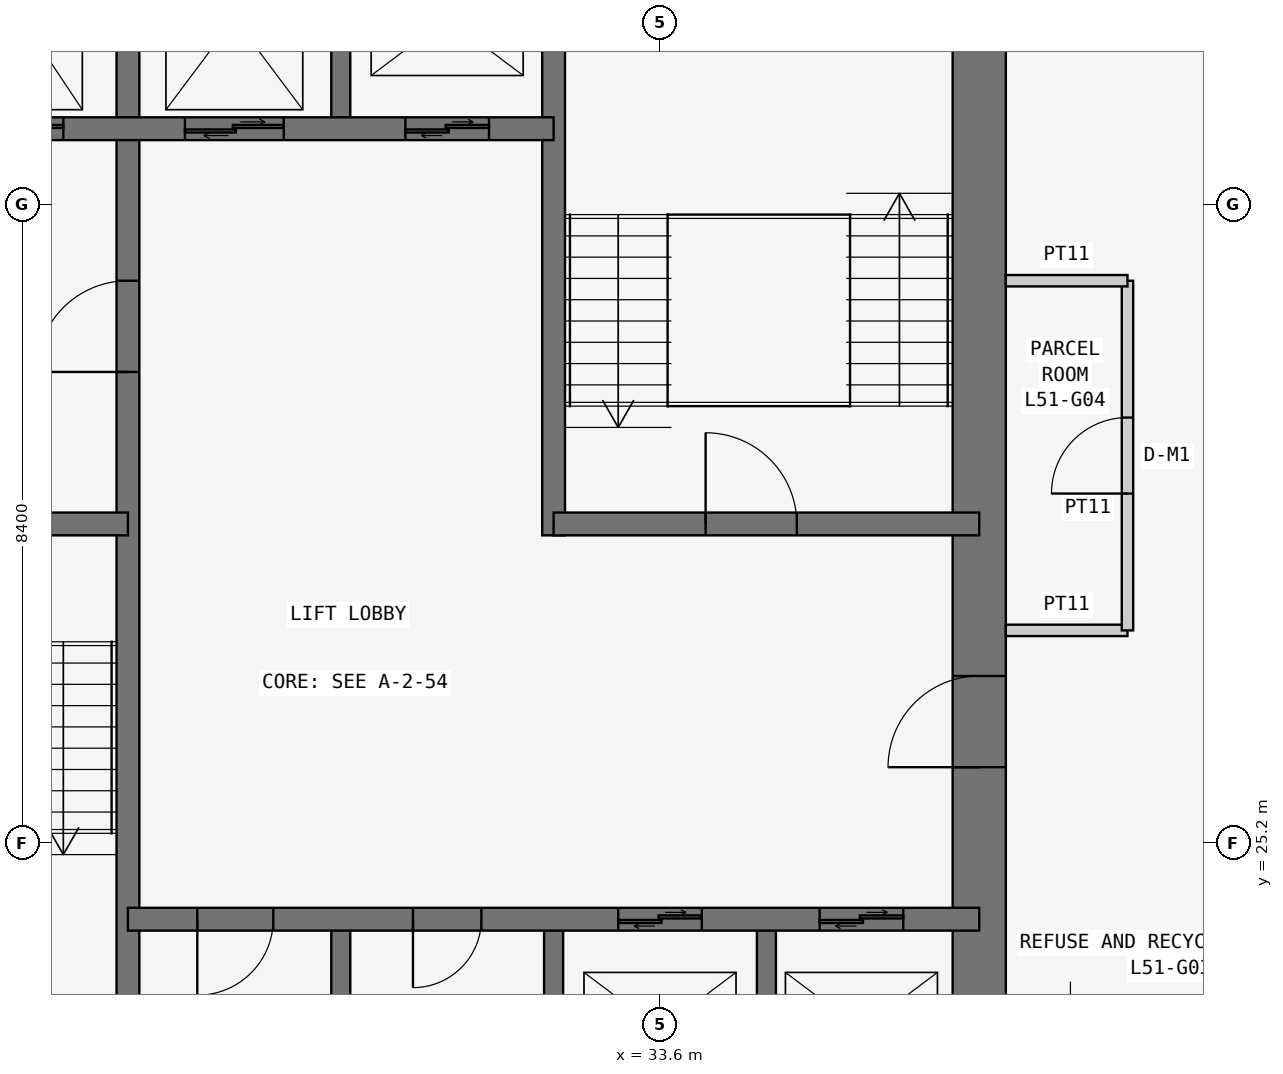
"""IFC4 building model, lengths in metres.
Left out: names, types, materials, properties, quantities, classifications, styles, units other than length and angle.
Written with IfcOpenShell. Run it as: python <this file> out.ifc"""

import sys

from ifc_helpers import new_model, si_unit, direction, frame, frame_2d, origin, place, context, subcontext, project, spatial, rectangle, extrude, element, fill, save


model = new_model("IFC4")
c1 = context("Model", 3, precision=1e-05, world=origin(), true_north=direction((0.0, 1.0)))
c2 = subcontext(c1, "Body", "Model", "MODEL_VIEW")
j1 = project(units=[si_unit("LENGTHUNIT", "METRE"), si_unit("PLANEANGLEUNIT", "RADIAN")], contexts=[c1])
p1 = place(None, origin())
s1 = spatial("IfcSite", under=j1, at=p1, CompositionType="ELEMENT")
p2 = place(p1, origin())
s2 = spatial("IfcBuilding", under=s1, at=p2, CompositionType="ELEMENT")
p3 = place(p2, frame((0.0, 0.0, 197.7)))
s3 = spatial("IfcBuildingStorey", under=s2, at=p3, CompositionType="ELEMENT", Elevation=197.7)
p4 = place(p3, frame((37.8, 21.0, 0.0), z_axis=(0.0, 0.0, 1.0), x_axis=(0.0, 1.0, 0.0)))
e1 = element("IfcWall", 1, at=p4, inside=s3, PredefinedType="SHEAR", context=c2, shape_type="SweptSolid", body=[
    extrude(rectangle(XDim=17.15, YDim=0.7, at=frame_2d((8.575, 0.0))), origin(), (0.0, 0.0, 1.0), 3.6),
])
p5 = place(p4, frame((5.2, 0.0, 0.0)))
e2 = element("IfcOpeningElement", 2, at=p5, cuts=e1, PredefinedType="OPENING", context=c2, shape_type="SweptSolid", body=[
    extrude(rectangle(XDim=1.2, YDim=2.1, at=frame_2d((0.6, 1.05))), frame((0.0, 0.36, 0.0), z_axis=(0.0, -1.0, 0.0), x_axis=(1.0, 0.0, 0.0)), (0.0, 0.0, 1.0), 0.72),
])
p6 = place(p3, frame((26.6, 21.0, 0.0), z_axis=(0.0, 0.0, 1.0), x_axis=(0.0, 1.0, 0.0)))
e3 = element("IfcWall", 3, at=p6, inside=s3, PredefinedType="SHEAR", context=c2, shape_type="SweptSolid", body=[
    extrude(rectangle(XDim=16.8, YDim=0.3, at=frame_2d((8.4, 0.0))), origin(), (0.0, 0.0, 1.0), 3.6),
])
p7 = place(p6, frame((10.4, 0.0, 0.0)))
e4 = element("IfcOpeningElement", 4, at=p7, cuts=e3, PredefinedType="OPENING", context=c2, shape_type="SweptSolid", body=[
    extrude(rectangle(XDim=1.2, YDim=2.1, at=frame_2d((0.6, 1.05))), frame((0.0, 0.16, 0.0), z_axis=(0.0, -1.0, 0.0), x_axis=(1.0, 0.0, 0.0)), (0.0, 0.0, 1.0), 0.32),
])
p8 = place(p3, frame((21.0, 29.4, 0.0), z_axis=(0.0, 0.0, 1.0), x_axis=(1.0, 0.0, 0.0)))
e5 = element("IfcWall", 5, at=p8, inside=s3, PredefinedType="SHEAR", context=c2, shape_type="SweptSolid", body=[
    extrude(rectangle(XDim=5.6, YDim=0.3, at=frame_2d((2.8, 0.0))), origin(), (0.0, 0.0, 1.0), 3.6),
])
p9 = place(p8, frame((2.3, 0.0, 0.0)))
e6 = element("IfcOpeningElement", 6, at=p9, cuts=e5, PredefinedType="OPENING", context=c2, shape_type="SweptSolid", body=[
    extrude(rectangle(XDim=1.2, YDim=2.1, at=frame_2d((0.6, 1.05))), frame((0.0, 0.16, 0.0), z_axis=(0.0, -1.0, 0.0), x_axis=(1.0, 0.0, 0.0)), (0.0, 0.0, 1.0), 0.32),
])
p10 = place(p3, frame((21.0, 34.6, 0.0), z_axis=(0.0, 0.0, 1.0), x_axis=(1.0, 0.0, 0.0)))
e7 = element("IfcWall", 7, at=p10, inside=s3, PredefinedType="SHEAR", context=c2, shape_type="SweptSolid", body=[
    extrude(rectangle(XDim=11.2, YDim=0.3, at=frame_2d((5.6, 0.0))), origin(), (0.0, 0.0, 1.0), 3.6),
])
p11 = place(p10, frame((9.25, 0.0, 0.0)))
e8 = element("IfcOpeningElement", 8, at=p11, cuts=e7, PredefinedType="OPENING", context=c2, shape_type="SweptSolid", body=[
    extrude(rectangle(XDim=1.1, YDim=2.1, at=frame_2d((0.55, 1.05))), frame((0.0, 0.16, 0.0), z_axis=(0.0, -1.0, 0.0), x_axis=(1.0, 0.0, 0.0)), (0.0, 0.0, 1.0), 0.32),
])
p12 = place(p10, frame((1.0, 0.0, 0.0)))
e9 = element("IfcOpeningElement", 9, at=p12, cuts=e7, PredefinedType="OPENING", context=c2, shape_type="SweptSolid", body=[
    extrude(rectangle(XDim=1.1, YDim=2.1, at=frame_2d((0.55, 1.05))), frame((0.0, 0.16, 0.0), z_axis=(0.0, -1.0, 0.0), x_axis=(1.0, 0.0, 0.0)), (0.0, 0.0, 1.0), 0.32),
])
p13 = place(p10, frame((3.65, 0.0, 0.0)))
e10 = element("IfcOpeningElement", 10, at=p13, cuts=e7, PredefinedType="OPENING", context=c2, shape_type="SweptSolid", body=[
    extrude(rectangle(XDim=1.1, YDim=2.1, at=frame_2d((0.55, 1.05))), frame((0.0, 0.16, 0.0), z_axis=(0.0, -1.0, 0.0), x_axis=(1.0, 0.0, 0.0)), (0.0, 0.0, 1.0), 0.32),
])
p14 = place(p10, frame((6.35, 0.0, 0.0)))
e11 = element("IfcOpeningElement", 11, at=p14, cuts=e7, PredefinedType="OPENING", context=c2, shape_type="SweptSolid", body=[
    extrude(rectangle(XDim=1.3, YDim=2.1, at=frame_2d((0.65, 1.05))), frame((0.0, 0.16, 0.0), z_axis=(0.0, -1.0, 0.0), x_axis=(1.0, 0.0, 0.0)), (0.0, 0.0, 1.0), 0.32),
])
p15 = place(p3, frame((26.6, 24.2, 0.0), z_axis=(0.0, 0.0, 1.0), x_axis=(1.0, 0.0, 0.0)))
e12 = element("IfcWall", 12, at=p15, inside=s3, PredefinedType="SHEAR", context=c2, shape_type="SweptSolid", body=[
    extrude(rectangle(XDim=11.2, YDim=0.3, at=frame_2d((5.6, 0.0))), origin(), (0.0, 0.0, 1.0), 3.6),
])
p16 = place(p15, frame((0.913, 0.0, 0.0)))
e13 = element("IfcOpeningElement", 13, at=p16, cuts=e12, PredefinedType="OPENING", context=c2, shape_type="SweptSolid", body=[
    extrude(rectangle(XDim=1.0, YDim=2.1, at=frame_2d((0.5, 1.05))), frame((0.0, 0.16, 0.0), z_axis=(0.0, -1.0, 0.0), x_axis=(1.0, 0.0, 0.0)), (0.0, 0.0, 1.0), 0.32),
])
p17 = place(p15, frame((3.75, 0.0, 0.0)))
e14 = element("IfcOpeningElement", 14, at=p17, cuts=e12, PredefinedType="OPENING", context=c2, shape_type="SweptSolid", body=[
    extrude(rectangle(XDim=0.9, YDim=2.1, at=frame_2d((0.45, 1.05))), frame((0.0, 0.16, 0.0), z_axis=(0.0, -1.0, 0.0), x_axis=(1.0, 0.0, 0.0)), (0.0, 0.0, 1.0), 0.32),
])
p18 = place(p15, frame((6.45, 0.0, 0.0)))
e15 = element("IfcOpeningElement", 15, at=p18, cuts=e12, PredefinedType="OPENING", context=c2, shape_type="SweptSolid", body=[
    extrude(rectangle(XDim=1.1, YDim=2.1, at=frame_2d((0.55, 1.05))), frame((0.0, 0.16, 0.0), z_axis=(0.0, -1.0, 0.0), x_axis=(1.0, 0.0, 0.0)), (0.0, 0.0, 1.0), 0.32),
])
p19 = place(p15, frame((9.1, 0.0, 0.0)))
e16 = element("IfcOpeningElement", 16, at=p19, cuts=e12, PredefinedType="OPENING", context=c2, shape_type="SweptSolid", body=[
    extrude(rectangle(XDim=1.1, YDim=2.1, at=frame_2d((0.55, 1.05))), frame((0.0, 0.16, 0.0), z_axis=(0.0, -1.0, 0.0), x_axis=(1.0, 0.0, 0.0)), (0.0, 0.0, 1.0), 0.32),
])
p20 = place(p3, frame((32.2, 29.25, 0.0), z_axis=(0.0, 0.0, 1.0), x_axis=(0.0, 1.0, 0.0)))
e17 = element("IfcWall", 17, at=p20, inside=s3, PredefinedType="SHEAR", context=c2, shape_type="SweptSolid", body=[
    extrude(rectangle(XDim=8.55, YDim=0.3, at=frame_2d((4.275, 0.0))), origin(), (0.0, 0.0, 1.0), 3.6),
])
p21 = place(p3, frame((32.2, 29.4, 0.0), z_axis=(0.0, 0.0, 1.0), x_axis=(1.0, 0.0, 0.0)))
e18 = element("IfcWall", 18, at=p21, inside=s3, PredefinedType="SHEAR", context=c2, shape_type="SweptSolid", body=[
    extrude(rectangle(XDim=5.6, YDim=0.3, at=frame_2d((2.8, 0.0))), origin(), (0.0, 0.0, 1.0), 3.6),
])
p22 = place(p21, frame((2.0, 0.0, 0.0)))
e19 = element("IfcOpeningElement", 19, at=p22, cuts=e18, PredefinedType="OPENING", context=c2, shape_type="SweptSolid", body=[
    extrude(rectangle(XDim=1.2, YDim=2.1, at=frame_2d((0.6, 1.05))), frame((0.0, 0.16, 0.0), z_axis=(0.0, -1.0, 0.0), x_axis=(1.0, 0.0, 0.0)), (0.0, 0.0, 1.0), 0.32),
])
for number, where, z_axis, x_axis in (
    (20, (29.4, 21.0, 0.0), (0.0, 0.0, 1.0), (0.0, 1.0, 0.0)),
    (21, (32.2, 21.0, 0.0), (0.0, 0.0, 1.0), (0.0, 1.0, 0.0)),
    (22, (35.0, 21.0, 0.0), (0.0, 0.0, 1.0), (0.0, 1.0, 0.0)),
    (23, (29.4, 34.6, 0.0), (0.0, 0.0, 1.0), (0.0, 1.0, 0.0)),
):
    element("IfcWall", number, at=place(p3, frame(where, z_axis=z_axis, x_axis=x_axis)), inside=s3, PredefinedType="SHEAR", context=c2, shape_type="SweptSolid", body=[
        extrude(rectangle(XDim=3.2, YDim=0.25, at=frame_2d((1.6, 0.0))), origin(), (0.0, 0.0, 1.0), 3.6),
    ])
p23 = place(p3, frame((38.15, 28.0, 0.0), z_axis=(0.0, 0.0, 1.0), x_axis=(1.0, 0.0, 0.0)))
e24 = element("IfcWall", 24, at=p23, inside=s3, PredefinedType="PARTITIONING", context=c2, shape_type="SweptSolid", body=[
    extrude(rectangle(XDim=1.6, YDim=0.15, at=frame_2d((0.8, 0.0))), origin(), (0.0, 0.0, 1.0), 3.45),
])
p24 = place(p3, frame((39.75, 28.0, 0.0), z_axis=(0.0, 0.0, 1.0), x_axis=(0.0, 1.0, 0.0)))
e25 = element("IfcWall", 25, at=p24, inside=s3, PredefinedType="PARTITIONING", context=c2, shape_type="SweptSolid", body=[
    extrude(rectangle(XDim=4.6, YDim=0.15, at=frame_2d((2.3, 0.0))), origin(), (0.0, 0.0, 1.0), 3.45),
])
p25 = place(p24, frame((1.8, 0.0, 0.0)))
e26 = element("IfcOpeningElement", 26, at=p25, cuts=e25, PredefinedType="OPENING", context=c2, shape_type="SweptSolid", body=[
    extrude(rectangle(XDim=1.0, YDim=2.1, at=frame_2d((0.5, 1.05))), frame((0.0, 0.085, 0.0), z_axis=(0.0, -1.0, 0.0), x_axis=(1.0, 0.0, 0.0)), (0.0, 0.0, 1.0), 0.17),
])
p26 = place(p3, frame((39.75, 32.6, 0.0), z_axis=(0.0, 0.0, 1.0), x_axis=(-1.0, 0.0, 0.0)))
e27 = element("IfcWall", 27, at=p26, inside=s3, PredefinedType="PARTITIONING", context=c2, shape_type="SweptSolid", body=[
    extrude(rectangle(XDim=1.6, YDim=0.15, at=frame_2d((0.8, 0.0))), origin(), (0.0, 0.0, 1.0), 3.45),
])
p27 = place(p25, origin())
e28 = element("IfcDoor", 28, at=p27, inside=s3, OperationType="SINGLE_SWING_LEFT", PredefinedType="DOOR", context=c2, shape_type="SweptSolid", body=[
    extrude(rectangle(XDim=1.0, YDim=2.1, at=frame_2d((0.5, 1.05))), frame((0.0, 0.025, 0.0), z_axis=(0.0, -1.0, 0.0), x_axis=(1.0, 0.0, 0.0)), (0.0, 0.0, 1.0), 0.05),
])
fill(e26, e28)
p28 = place(p7, origin())
e29 = element("IfcDoor", 29, at=p28, inside=s3, OperationType="SINGLE_SWING_LEFT", PredefinedType="DOOR", context=c2, shape_type="SweptSolid", body=[
    extrude(rectangle(XDim=1.2, YDim=2.1, at=frame_2d((0.6, 1.05))), frame((0.0, 0.025, 0.0), z_axis=(0.0, -1.0, 0.0), x_axis=(1.0, 0.0, 0.0)), (0.0, 0.0, 1.0), 0.05),
])
fill(e4, e29)
p29 = place(p5, origin())
e30 = element("IfcDoor", 30, at=p29, inside=s3, OperationType="SINGLE_SWING_LEFT", PredefinedType="DOOR", context=c2, shape_type="SweptSolid", body=[
    extrude(rectangle(XDim=1.2, YDim=2.1, at=frame_2d((0.6, 1.05))), frame((0.0, 0.025, 0.0), z_axis=(0.0, -1.0, 0.0), x_axis=(1.0, 0.0, 0.0)), (0.0, 0.0, 1.0), 0.05),
])
fill(e2, e30)
p30 = place(p22, origin())
e31 = element("IfcDoor", 31, at=p30, inside=s3, OperationType="SINGLE_SWING_LEFT", PredefinedType="DOOR", context=c2, shape_type="SweptSolid", body=[
    extrude(rectangle(XDim=1.2, YDim=2.1, at=frame_2d((0.6, 1.05))), frame((0.0, 0.025, 0.0), z_axis=(0.0, -1.0, 0.0), x_axis=(1.0, 0.0, 0.0)), (0.0, 0.0, 1.0), 0.05),
])
fill(e19, e31)
p31 = place(p16, frame((1.0, 0.0, 0.0), z_axis=(0.0, 0.0, 1.0), x_axis=(-1.0, 0.0, 0.0)))
e32 = element("IfcDoor", 32, at=p31, inside=s3, OperationType="SINGLE_SWING_RIGHT", PredefinedType="DOOR", context=c2, shape_type="SweptSolid", body=[
    extrude(rectangle(XDim=1.0, YDim=2.1, at=frame_2d((0.5, 1.05))), frame((0.0, 0.025, 0.0), z_axis=(0.0, -1.0, 0.0), x_axis=(1.0, 0.0, 0.0)), (0.0, 0.0, 1.0), 0.05),
])
fill(e13, e32)
p32 = place(p17, frame((0.9, 0.0, 0.0), z_axis=(0.0, 0.0, 1.0), x_axis=(-1.0, 0.0, 0.0)))
e33 = element("IfcDoor", 33, at=p32, inside=s3, OperationType="SINGLE_SWING_RIGHT", PredefinedType="DOOR", context=c2, shape_type="SweptSolid", body=[
    extrude(rectangle(XDim=0.9, YDim=2.1, at=frame_2d((0.45, 1.05))), frame((0.0, 0.025, 0.0), z_axis=(0.0, -1.0, 0.0), x_axis=(1.0, 0.0, 0.0)), (0.0, 0.0, 1.0), 0.05),
])
fill(e14, e33)
p33 = place(p18, origin())
e34 = element("IfcDoor", 34, at=p33, inside=s3, OperationType="DOUBLE_DOOR_SLIDING", PredefinedType="DOOR", context=c2, shape_type="SweptSolid", body=[
    extrude(rectangle(XDim=1.1, YDim=2.1, at=frame_2d((0.55, 1.05))), frame((0.0, 0.025, 0.0), z_axis=(0.0, -1.0, 0.0), x_axis=(1.0, 0.0, 0.0)), (0.0, 0.0, 1.0), 0.05),
])
fill(e15, e34)
p34 = place(p19, origin())
e35 = element("IfcDoor", 35, at=p34, inside=s3, OperationType="DOUBLE_DOOR_SLIDING", PredefinedType="DOOR", context=c2, shape_type="SweptSolid", body=[
    extrude(rectangle(XDim=1.1, YDim=2.1, at=frame_2d((0.55, 1.05))), frame((0.0, 0.025, 0.0), z_axis=(0.0, -1.0, 0.0), x_axis=(1.0, 0.0, 0.0)), (0.0, 0.0, 1.0), 0.05),
])
fill(e16, e35)
p35 = place(p11, origin())
e36 = element("IfcDoor", 36, at=p35, inside=s3, OperationType="DOUBLE_DOOR_SLIDING", PredefinedType="DOOR", context=c2, shape_type="SweptSolid", body=[
    extrude(rectangle(XDim=1.1, YDim=2.1, at=frame_2d((0.55, 1.05))), frame((0.0, 0.025, 0.0), z_axis=(0.0, -1.0, 0.0), x_axis=(1.0, 0.0, 0.0)), (0.0, 0.0, 1.0), 0.05),
])
fill(e8, e36)
p36 = place(p13, origin())
e37 = element("IfcDoor", 37, at=p36, inside=s3, OperationType="DOUBLE_DOOR_SLIDING", PredefinedType="DOOR", context=c2, shape_type="SweptSolid", body=[
    extrude(rectangle(XDim=1.1, YDim=2.1, at=frame_2d((0.55, 1.05))), frame((0.0, 0.025, 0.0), z_axis=(0.0, -1.0, 0.0), x_axis=(1.0, 0.0, 0.0)), (0.0, 0.0, 1.0), 0.05),
])
fill(e10, e37)
p37 = place(p14, origin())
e38 = element("IfcDoor", 38, at=p37, inside=s3, OperationType="DOUBLE_DOOR_SLIDING", PredefinedType="DOOR", context=c2, shape_type="SweptSolid", body=[
    extrude(rectangle(XDim=1.3, YDim=2.1, at=frame_2d((0.65, 1.05))), frame((0.0, 0.025, 0.0), z_axis=(0.0, -1.0, 0.0), x_axis=(1.0, 0.0, 0.0)), (0.0, 0.0, 1.0), 0.05),
])
fill(e11, e38)
save(model, sys.argv[1])
